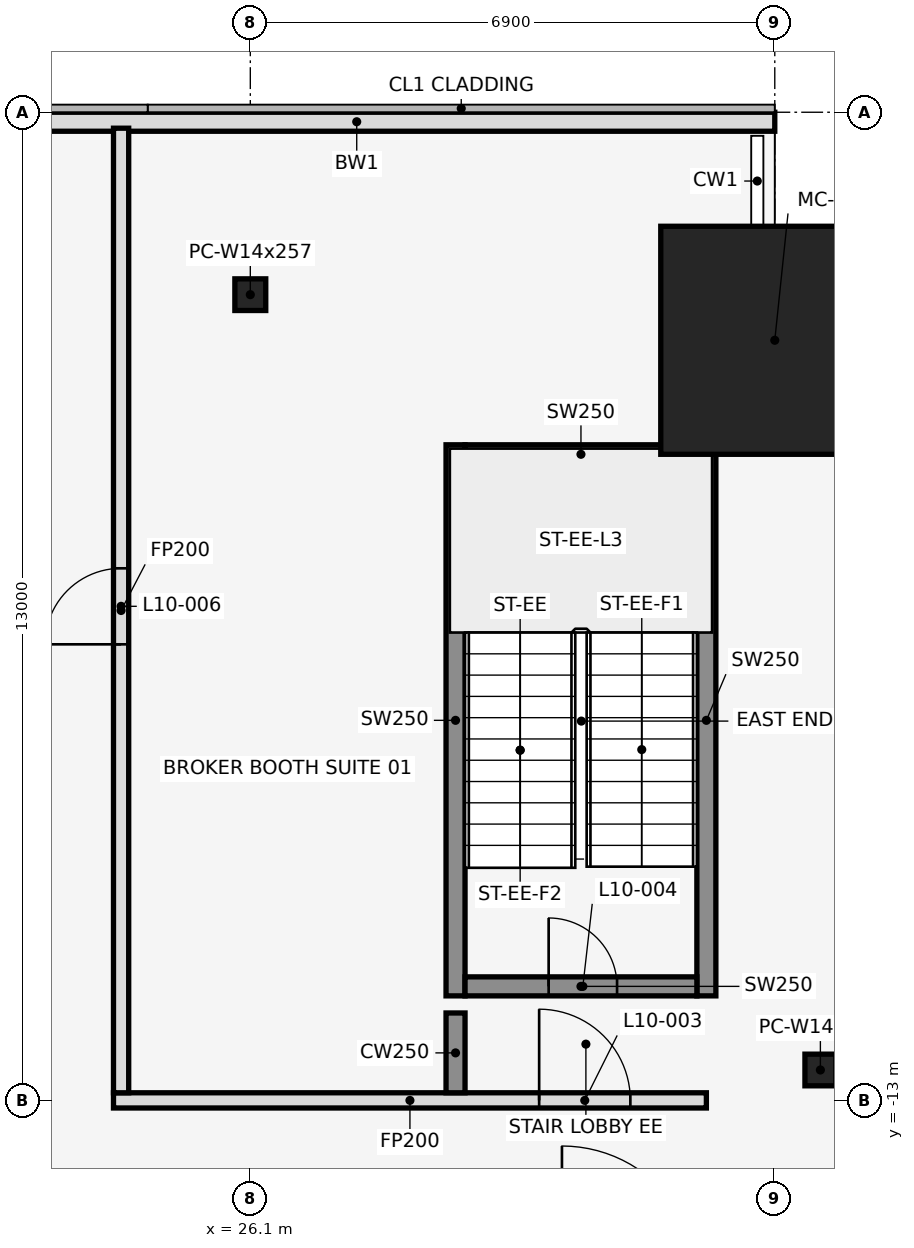
"""IFC4 building model, lengths in metres.
Left out: names, types, materials, properties, quantities, classifications, styles, units other than length and angle.
Written with IfcOpenShell. Run it as: python <this file> out.ifc"""

import sys

from ifc_helpers import new_model, si_unit, direction, frame, frame_2d, origin, origin_2d, place, context, subcontext, project, spatial, rectangle, hollow_rectangle, i_section, extrude, element, fill, save


model = new_model("IFC4")
c1 = context("Model", 3, precision=1e-05, world=origin(), true_north=direction((0.0, 1.0)))
c2 = subcontext(c1, "Body", "Model", "MODEL_VIEW")
j1 = project(units=[si_unit("LENGTHUNIT", "METRE"), si_unit("PLANEANGLEUNIT", "RADIAN")], contexts=[c1])
p1 = place(None, origin())
s1 = spatial("IfcSite", under=j1, at=p1, CompositionType="ELEMENT")
p2 = place(p1, origin())
s2 = spatial("IfcBuilding", under=s1, at=p2, CompositionType="ELEMENT")
p3 = place(p2, frame((0.0, 0.0, 53.0)))
s3 = spatial("IfcBuildingStorey", under=s2, at=p3, CompositionType="ELEMENT", Elevation=53.0)
p4 = place(p3, frame((26.1, -2.4, 0.0), z_axis=(0.0, 0.0, 1.0), x_axis=(1.0, 0.0, 0.0)))
e1 = element("IfcColumn", 1, at=p4, inside=s3, PredefinedType="COLUMN", context=c2, shape_type="SweptSolid", body=[
    extrude(i_section(OverallWidth=0.406, OverallDepth=0.417, WebThickness=0.03, FlangeThickness=0.048, at=origin_2d()), origin(), (0.0, 0.0, 1.0), 4.5),
])
p5 = place(p3, frame((33.0, -3.0, 0.0), z_axis=(0.0, 0.0, 1.0), x_axis=(1.0, 0.0, 0.0)))
e2 = element("IfcColumn", 2, at=p5, inside=s3, PredefinedType="COLUMN", context=c2, shape_type="SweptSolid", body=[
    extrude(hollow_rectangle(XDim=3.0, YDim=3.0, WallThickness=0.1, at=origin_2d()), origin(), (0.0, 0.0, 1.0), 4.5),
])
p6 = place(p3, frame((33.6, -12.6, 0.0), z_axis=(0.0, 0.0, 1.0), x_axis=(1.0, 0.0, 0.0)))
e3 = element("IfcColumn", 3, at=p6, inside=s3, PredefinedType="COLUMN", context=c2, shape_type="SweptSolid", body=[
    extrude(i_section(OverallWidth=0.406, OverallDepth=0.417, WebThickness=0.03, FlangeThickness=0.048, at=origin_2d()), origin(), (0.0, 0.0, 1.0), 4.5),
])
p7 = place(p3, frame((33.0, -0.125, 0.0), z_axis=(0.0, 0.0, 1.0), x_axis=(-1.0, 0.0, 0.0)))
e4 = element("IfcWall", 4, at=p7, inside=s3, PredefinedType="STANDARD", context=c2, shape_type="SweptSolid", body=[
    extrude(rectangle(XDim=11.0, YDim=0.25, at=frame_2d((5.5, 0.0))), origin(), (0.0, 0.0, 1.0), 4.35),
])
for number, where, z_axis, x_axis in (
    (5, (28.8, -11.625, 0.0), (0.0, 0.0, 1.0), (0.0, 1.0, 0.0)),
    (6, (32.1, -11.625, 0.0), (0.0, 0.0, 1.0), (0.0, 1.0, 0.0)),
):
    element("IfcWall", number, at=place(p3, frame(where, z_axis=z_axis, x_axis=x_axis)), inside=s3, PredefinedType="SHEAR", context=c2, shape_type="SweptSolid", body=[
        extrude(rectangle(XDim=7.25, YDim=0.25, at=frame_2d((3.625, 0.0))), origin(), (0.0, 0.0, 1.0), 4.5),
    ])
p8 = place(p3, frame((28.925, -11.5, 0.0), z_axis=(0.0, 0.0, 1.0), x_axis=(1.0, 0.0, 0.0)))
e7 = element("IfcWall", 7, at=p8, inside=s3, PredefinedType="SHEAR", context=c2, shape_type="SweptSolid", body=[
    extrude(rectangle(XDim=3.05, YDim=0.25, at=frame_2d((1.525, 0.0))), origin(), (0.0, 0.0, 1.0), 4.5),
])
p9 = place(p8, frame((1.1, 0.0, 0.0)))
e8 = element("IfcOpeningElement", 8, at=p9, cuts=e7, PredefinedType="OPENING", context=c2, shape_type="SweptSolid", body=[
    extrude(rectangle(XDim=0.9, YDim=2.1, at=frame_2d((0.45, 1.05))), frame((0.0, 0.137, 0.0), z_axis=(0.0, -1.0, 0.0), x_axis=(1.0, 0.0, 0.0)), (0.0, 0.0, 1.0), 0.274),
])
p10 = place(p3, frame((28.925, -4.5, 0.0), z_axis=(0.0, 0.0, 1.0), x_axis=(1.0, 0.0, 0.0)))
e9 = element("IfcWall", 9, at=p10, inside=s3, PredefinedType="SHEAR", context=c2, shape_type="SweptSolid", body=[
    extrude(rectangle(XDim=3.05, YDim=0.25, at=frame_2d((1.525, 0.0))), origin(), (0.0, 0.0, 1.0), 4.5),
])
p11 = place(p3, frame((24.3, -13.0, 0.0), z_axis=(0.0, 0.0, 1.0), x_axis=(1.0, 0.0, 0.0)))
e10 = element("IfcWall", 10, at=p11, inside=s3, PredefinedType="PARTITIONING", context=c2, shape_type="SweptSolid", body=[
    extrude(rectangle(XDim=7.8, YDim=0.2, at=frame_2d((3.9, 0.0))), origin(), (0.0, 0.0, 1.0), 3.418),
])
p12 = place(p11, frame((5.6, 0.0, 0.0)))
e11 = element("IfcOpeningElement", 11, at=p12, cuts=e10, PredefinedType="OPENING", context=c2, shape_type="SweptSolid", body=[
    extrude(rectangle(XDim=1.2, YDim=2.1, at=frame_2d((0.6, 1.05))), frame((0.0, 0.112, 0.0), z_axis=(0.0, -1.0, 0.0), x_axis=(1.0, 0.0, 0.0)), (0.0, 0.0, 1.0), 0.224),
])
p13 = place(p3, frame((24.4, -12.9, 0.0), z_axis=(0.0, 0.0, 1.0), x_axis=(0.0, 1.0, 0.0)))
e12 = element("IfcWall", 12, at=p13, inside=s3, PredefinedType="PARTITIONING", context=c2, shape_type="SweptSolid", body=[
    extrude(rectangle(XDim=12.69, YDim=0.2, at=frame_2d((6.345, 0.0))), origin(), (0.0, 0.0, 1.0), 3.418),
])
p14 = place(p13, frame((5.9, 0.0, 0.0)))
e13 = element("IfcOpeningElement", 13, at=p14, cuts=e12, PredefinedType="OPENING", context=c2, shape_type="SweptSolid", body=[
    extrude(rectangle(XDim=1.0, YDim=2.1, at=frame_2d((0.5, 1.05))), frame((0.0, 0.112, 0.0), z_axis=(0.0, -1.0, 0.0), x_axis=(1.0, 0.0, 0.0)), (0.0, 0.0, 1.0), 0.224),
])
p15 = place(p3, frame((28.8, -12.9, 0.0), z_axis=(0.0, 0.0, 1.0), x_axis=(0.0, 1.0, 0.0)))
e14 = element("IfcWall", 14, at=p15, inside=s3, PredefinedType="SHEAR", context=c2, shape_type="SweptSolid", body=[
    extrude(rectangle(XDim=1.05, YDim=0.25, at=frame_2d((0.525, 0.0))), origin(), (0.0, 0.0, 1.0), 4.5),
])
p16 = place(p12, origin())
e15 = element("IfcDoor", 15, at=p16, inside=s3, OperationType="SINGLE_SWING_RIGHT", PredefinedType="DOOR", context=c2, shape_type="SweptSolid", body=[
    extrude(rectangle(XDim=1.2, YDim=2.1, at=frame_2d((0.6, 1.05))), frame((0.0, 0.025, 0.0), z_axis=(0.0, -1.0, 0.0), x_axis=(1.0, 0.0, 0.0)), (0.0, 0.0, 1.0), 0.05),
])
fill(e11, e15)
p17 = place(p9, origin())
e16 = element("IfcDoor", 16, at=p17, inside=s3, OperationType="SINGLE_SWING_LEFT", PredefinedType="DOOR", context=c2, shape_type="SweptSolid", body=[
    extrude(rectangle(XDim=0.9, YDim=2.1, at=frame_2d((0.45, 1.05))), frame((0.0, 0.025, 0.0), z_axis=(0.0, -1.0, 0.0), x_axis=(1.0, 0.0, 0.0)), (0.0, 0.0, 1.0), 0.05),
])
fill(e8, e16)
p18 = place(p14, frame((1.0, 0.0, 0.0), z_axis=(0.0, 0.0, 1.0), x_axis=(-1.0, 0.0, 0.0)))
e17 = element("IfcDoor", 17, at=p18, inside=s3, OperationType="SINGLE_SWING_RIGHT", PredefinedType="DOOR", context=c2, shape_type="SweptSolid", body=[
    extrude(rectangle(XDim=1.0, YDim=2.1, at=frame_2d((0.5, 1.05))), frame((0.0, 0.025, 0.0), z_axis=(0.0, -1.0, 0.0), x_axis=(1.0, 0.0, 0.0)), (0.0, 0.0, 1.0), 0.05),
])
fill(e13, e17)
save(model, sys.argv[1])
